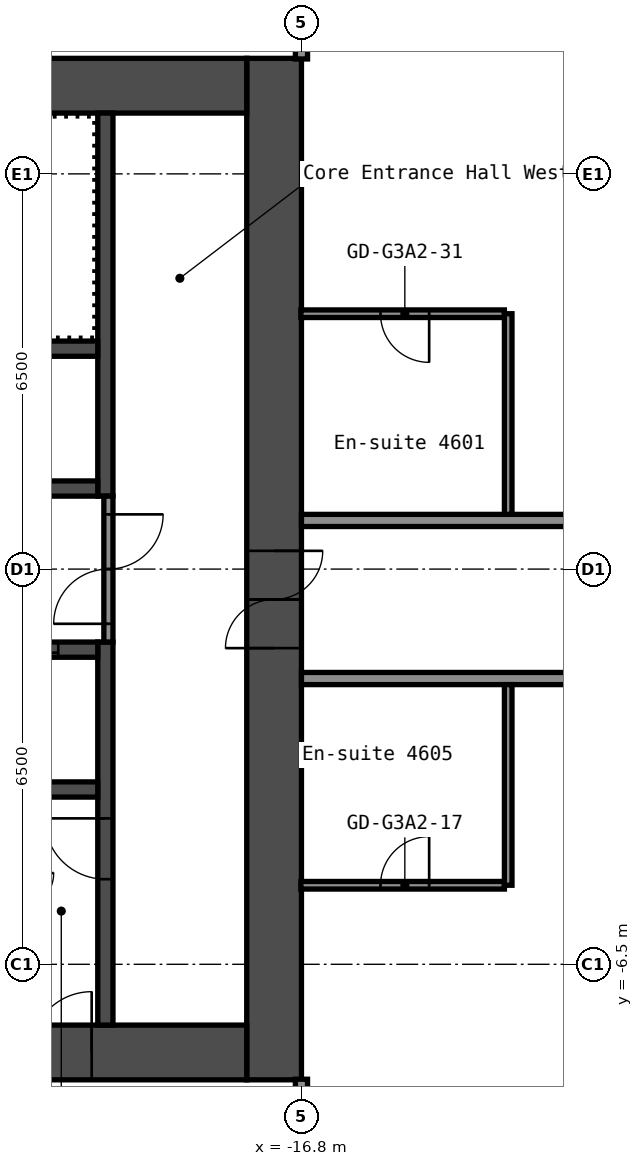
"""IFC4 building model, lengths in metres.
Left out: names, types, materials, properties, quantities, classifications, styles, units other than length and angle.
Written with IfcOpenShell. Run it as: python <this file> out.ifc"""

import sys

from ifc_helpers import new_model, si_unit, direction, frame, frame_2d, origin, place, context, subcontext, project, spatial, rectangle, extrude, element, fill, save


model = new_model("IFC4")
c1 = context("Model", 3, precision=1e-05, world=origin(), true_north=direction((0.0, 1.0)))
c2 = subcontext(c1, "Body", "Model", "MODEL_VIEW")
j1 = project(units=[si_unit("LENGTHUNIT", "METRE"), si_unit("PLANEANGLEUNIT", "RADIAN")], contexts=[c1])
p1 = place(None, origin())
s1 = spatial("IfcSite", under=j1, at=p1, CompositionType="ELEMENT")
p2 = place(p1, origin())
s2 = spatial("IfcBuilding", under=s1, at=p2, CompositionType="ELEMENT")
p3 = place(p2, frame((0.0, 0.0, 163.0)))
s3 = spatial("IfcBuildingStorey", under=s2, at=p3, CompositionType="ELEMENT", Elevation=163.0)
p4 = place(p3, frame((-17.25, -8.4, 0.0), z_axis=(0.0, 0.0, 1.0), x_axis=(0.0, 1.0, 0.0)))
e1 = element("IfcWall", 1, at=p4, inside=s3, PredefinedType="SHEAR", context=c2, shape_type="SweptSolid", body=[
    extrude(rectangle(XDim=16.8, YDim=0.9, at=frame_2d((8.4, 0.0))), origin(), (0.0, 0.0, 1.0), 2.75),
])
p5 = place(p4, frame((7.1, 0.0, 0.0)))
e2 = element("IfcOpeningElement", 2, at=p5, cuts=e1, PredefinedType="OPENING", context=c2, shape_type="SweptSolid", body=[
    extrude(rectangle(XDim=1.6, YDim=2.1, at=frame_2d((0.8, 1.05))), frame((0.0, 0.46, 0.0), z_axis=(0.0, -1.0, 0.0), x_axis=(1.0, 0.0, 0.0)), (0.0, 0.0, 1.0), 0.92),
])
p6 = place(p3, frame((-32.7, 7.95, 0.0), z_axis=(0.0, 0.0, 1.0), x_axis=(1.0, 0.0, 0.0)))
e3 = element("IfcWall", 3, at=p6, inside=s3, PredefinedType="SHEAR", context=c2, shape_type="SweptSolid", body=[
    extrude(rectangle(XDim=15.0, YDim=0.9, at=frame_2d((7.5, 0.0))), origin(), (0.0, 0.0, 1.0), 2.75),
])
p7 = place(p6, frame((3.4, 0.0, 0.0)))
e4 = element("IfcOpeningElement", 4, at=p7, cuts=e3, PredefinedType="OPENING", context=c2, shape_type="SweptSolid", body=[
    extrude(rectangle(XDim=1.2, YDim=2.1, at=frame_2d((0.6, 1.05))), frame((0.0, 0.46, 0.0), z_axis=(0.0, -1.0, 0.0), x_axis=(1.0, 0.0, 0.0)), (0.0, 0.0, 1.0), 0.92),
])
p8 = place(p6, frame((0.75, 0.0, 0.0)))
e5 = element("IfcOpeningElement", 5, at=p8, cuts=e3, PredefinedType="OPENING", context=c2, shape_type="SweptSolid", body=[
    extrude(rectangle(XDim=0.9, YDim=2.1, at=frame_2d((0.45, 1.05))), frame((0.0, 0.46, 0.0), z_axis=(0.0, -1.0, 0.0), x_axis=(1.0, 0.0, 0.0)), (0.0, 0.0, 1.0), 0.92),
])
p9 = place(p3, frame((-32.7, -7.95, 0.0), z_axis=(0.0, 0.0, 1.0), x_axis=(1.0, 0.0, 0.0)))
e6 = element("IfcWall", 6, at=p9, inside=s3, PredefinedType="SHEAR", context=c2, shape_type="SweptSolid", body=[
    extrude(rectangle(XDim=15.0, YDim=0.9, at=frame_2d((7.5, 0.0))), origin(), (0.0, 0.0, 1.0), 2.75),
])
p10 = place(p9, frame((11.45, 0.0, 0.0)))
e7 = element("IfcOpeningElement", 7, at=p10, cuts=e6, PredefinedType="OPENING", context=c2, shape_type="SweptSolid", body=[
    extrude(rectangle(XDim=1.0, YDim=2.1, at=frame_2d((0.5, 1.05))), frame((0.0, 0.46, 0.0), z_axis=(0.0, -1.0, 0.0), x_axis=(1.0, 0.0, 0.0)), (0.0, 0.0, 1.0), 0.92),
])
p11 = place(p3, frame((-20.025, 1.2, 0.0), z_axis=(0.0, 0.0, 1.0), x_axis=(0.0, 1.0, 0.0)))
e8 = element("IfcWall", 8, at=p11, inside=s3, PredefinedType="SHEAR", context=c2, shape_type="SweptSolid", body=[
    extrude(rectangle(XDim=6.3, YDim=0.25, at=frame_2d((3.15, 0.0))), origin(), (0.0, 0.0, 1.0), 2.75),
])
p12 = place(p3, frame((-20.025, -7.5, 0.0), z_axis=(0.0, 0.0, 1.0), x_axis=(0.0, 1.0, 0.0)))
e9 = element("IfcWall", 9, at=p12, inside=s3, PredefinedType="SHEAR", context=c2, shape_type="SweptSolid", body=[
    extrude(rectangle(XDim=6.3, YDim=0.25, at=frame_2d((3.15, 0.0))), origin(), (0.0, 0.0, 1.0), 2.75),
])
p13 = place(p12, frame((2.4, 0.0, 0.0)))
e10 = element("IfcOpeningElement", 10, at=p13, cuts=e9, PredefinedType="OPENING", context=c2, shape_type="SweptSolid", body=[
    extrude(rectangle(XDim=1.0, YDim=2.1, at=frame_2d((0.5, 1.05))), frame((0.0, 0.135, 0.0), z_axis=(0.0, -1.0, 0.0), x_axis=(1.0, 0.0, 0.0)), (0.0, 0.0, 1.0), 0.27),
])
p14 = place(p3, frame((-27.65, 1.325, 0.0), z_axis=(0.0, 0.0, 1.0), x_axis=(1.0, 0.0, 0.0)))
e11 = element("IfcWall", 11, at=p14, inside=s3, PredefinedType="SHEAR", context=c2, shape_type="SweptSolid", body=[
    extrude(rectangle(XDim=7.5, YDim=0.25, at=frame_2d((3.75, 0.0))), origin(), (0.0, 0.0, 1.0), 2.75),
])
p15 = place(p14, frame((4.363, 0.0, 0.0)))
e12 = element("IfcOpeningElement", 12, at=p15, cuts=e11, PredefinedType="OPENING", context=c2, shape_type="SweptSolid", body=[
    extrude(rectangle(XDim=0.9, YDim=2.1, at=frame_2d((0.45, 1.05))), frame((0.0, 0.135, 0.0), z_axis=(0.0, -1.0, 0.0), x_axis=(1.0, 0.0, 0.0)), (0.0, 0.0, 1.0), 0.27),
])
p16 = place(p14, frame((0.663, 0.0, 0.0)))
e13 = element("IfcOpeningElement", 13, at=p16, cuts=e11, PredefinedType="OPENING", context=c2, shape_type="SweptSolid", body=[
    extrude(rectangle(XDim=0.9, YDim=2.1, at=frame_2d((0.45, 1.05))), frame((0.0, 0.135, 0.0), z_axis=(0.0, -1.0, 0.0), x_axis=(1.0, 0.0, 0.0)), (0.0, 0.0, 1.0), 0.27),
])
p17 = place(p3, frame((-27.65, 3.625, 0.0), z_axis=(0.0, 0.0, 1.0), x_axis=(1.0, 0.0, 0.0)))
e14 = element("IfcWall", 14, at=p17, inside=s3, PredefinedType="SHEAR", context=c2, shape_type="SweptSolid", body=[
    extrude(rectangle(XDim=7.5, YDim=0.25, at=frame_2d((3.75, 0.0))), origin(), (0.0, 0.0, 1.0), 2.75),
])
p18 = place(p3, frame((-27.65, -1.325, 0.0), z_axis=(0.0, 0.0, 1.0), x_axis=(1.0, 0.0, 0.0)))
e15 = element("IfcWall", 15, at=p18, inside=s3, PredefinedType="SHEAR", context=c2, shape_type="SweptSolid", body=[
    extrude(rectangle(XDim=7.5, YDim=0.25, at=frame_2d((3.75, 0.0))), origin(), (0.0, 0.0, 1.0), 2.75),
])
p19 = place(p18, frame((5.75, 0.0, 0.0)))
e16 = element("IfcOpeningElement", 16, at=p19, cuts=e15, PredefinedType="OPENING", context=c2, shape_type="SweptSolid", body=[
    extrude(rectangle(XDim=1.1, YDim=2.1, at=frame_2d((0.55, 1.05))), frame((0.0, 0.135, 0.0), z_axis=(0.0, -1.0, 0.0), x_axis=(1.0, 0.0, 0.0)), (0.0, 0.0, 1.0), 0.27),
])
p20 = place(p18, frame((3.35, 0.0, 0.0)))
e17 = element("IfcOpeningElement", 17, at=p20, cuts=e15, PredefinedType="OPENING", context=c2, shape_type="SweptSolid", body=[
    extrude(rectangle(XDim=1.1, YDim=2.1, at=frame_2d((0.55, 1.05))), frame((0.0, 0.135, 0.0), z_axis=(0.0, -1.0, 0.0), x_axis=(1.0, 0.0, 0.0)), (0.0, 0.0, 1.0), 0.27),
])
p21 = place(p18, frame((0.95, 0.0, 0.0)))
e18 = element("IfcOpeningElement", 18, at=p21, cuts=e15, PredefinedType="OPENING", context=c2, shape_type="SweptSolid", body=[
    extrude(rectangle(XDim=1.1, YDim=2.1, at=frame_2d((0.55, 1.05))), frame((0.0, 0.135, 0.0), z_axis=(0.0, -1.0, 0.0), x_axis=(1.0, 0.0, 0.0)), (0.0, 0.0, 1.0), 0.27),
])
p22 = place(p3, frame((-27.65, -3.625, 0.0), z_axis=(0.0, 0.0, 1.0), x_axis=(1.0, 0.0, 0.0)))
e19 = element("IfcWall", 19, at=p22, inside=s3, PredefinedType="SHEAR", context=c2, shape_type="SweptSolid", body=[
    extrude(rectangle(XDim=7.5, YDim=0.25, at=frame_2d((3.75, 0.0))), origin(), (0.0, 0.0, 1.0), 2.75),
])
p23 = place(p3, frame((-19.975, -1.2, 0.0), z_axis=(0.0, 0.0, 1.0), x_axis=(0.0, 1.0, 0.0)))
e20 = element("IfcWall", 20, at=p23, inside=s3, PredefinedType="PARTITIONING", context=c2, shape_type="SweptSolid", body=[
    extrude(rectangle(XDim=2.4, YDim=0.15, at=frame_2d((1.2, 0.0))), origin(), (0.0, 0.0, 1.0), 2.75),
])
p24 = place(p23, frame((0.3, 0.0, 0.0)))
e21 = element("IfcOpeningElement", 21, at=p24, cuts=e20, PredefinedType="OPENING", context=c2, shape_type="SweptSolid", body=[
    extrude(rectangle(XDim=1.8, YDim=2.1, at=frame_2d((0.9, 1.05))), frame((0.0, 0.085, 0.0), z_axis=(0.0, -1.0, 0.0), x_axis=(1.0, 0.0, 0.0)), (0.0, 0.0, 1.0), 0.17),
])
p25 = place(p3, frame((-16.81, -5.2, 0.0), z_axis=(0.0, 0.0, 1.0), x_axis=(1.0, 0.0, 0.0)))
e22 = element("IfcWall", 22, at=p25, inside=s3, PredefinedType="PARTITIONING", context=c2, shape_type="SweptSolid", body=[
    extrude(rectangle(XDim=3.348, YDim=0.125, at=frame_2d((1.674, 0.0))), origin(), (0.0, 0.0, 1.0), 2.75),
])
p26 = place(p25, frame((1.31, 0.0, 0.0)))
e23 = element("IfcOpeningElement", 23, at=p26, cuts=e22, PredefinedType="OPENING", context=c2, shape_type="SweptSolid", body=[
    extrude(rectangle(XDim=0.8, YDim=2.1, at=frame_2d((0.4, 1.05))), frame((0.0, 0.073, 0.0), z_axis=(0.0, -1.0, 0.0), x_axis=(1.0, 0.0, 0.0)), (0.0, 0.0, 1.0), 0.145),
])
p27 = place(p3, frame((-16.8, -1.8, 0.0), z_axis=(0.0, 0.0, 1.0), x_axis=(1.0, 0.0, 0.0)))
e24 = element("IfcWall", 24, at=p27, inside=s3, PredefinedType="PARTITIONING", context=c2, shape_type="SweptSolid", body=[
    extrude(rectangle(XDim=33.6, YDim=0.2, at=frame_2d((16.8, 0.0))), origin(), (0.0, 0.0, 1.0), 2.75),
])
p28 = place(p27, frame((5.4, 0.0, 0.0)))
e25 = element("IfcOpeningElement", 25, at=p28, cuts=e24, PredefinedType="OPENING", context=c2, shape_type="SweptSolid", body=[
    extrude(rectangle(XDim=1.0, YDim=2.1, at=frame_2d((0.5, 1.05))), frame((0.0, 0.11, 0.0), z_axis=(0.0, -1.0, 0.0), x_axis=(1.0, 0.0, 0.0)), (0.0, 0.0, 1.0), 0.22),
])
p29 = place(p27, frame((10.385, 0.0, 0.0)))
e26 = element("IfcOpeningElement", 26, at=p29, cuts=e24, PredefinedType="OPENING", context=c2, shape_type="SweptSolid", body=[
    extrude(rectangle(XDim=0.9, YDim=2.1, at=frame_2d((0.45, 1.05))), frame((0.0, 0.11, 0.0), z_axis=(0.0, -1.0, 0.0), x_axis=(1.0, 0.0, 0.0)), (0.0, 0.0, 1.0), 0.22),
])
p30 = place(p27, frame((14.585, 0.0, 0.0)))
e27 = element("IfcOpeningElement", 27, at=p30, cuts=e24, PredefinedType="OPENING", context=c2, shape_type="SweptSolid", body=[
    extrude(rectangle(XDim=0.9, YDim=2.1, at=frame_2d((0.45, 1.05))), frame((0.0, 0.11, 0.0), z_axis=(0.0, -1.0, 0.0), x_axis=(1.0, 0.0, 0.0)), (0.0, 0.0, 1.0), 0.22),
])
p31 = place(p27, frame((22.2, 0.0, 0.0)))
e28 = element("IfcOpeningElement", 28, at=p31, cuts=e24, PredefinedType="OPENING", context=c2, shape_type="SweptSolid", body=[
    extrude(rectangle(XDim=1.0, YDim=2.1, at=frame_2d((0.5, 1.05))), frame((0.0, 0.11, 0.0), z_axis=(0.0, -1.0, 0.0), x_axis=(1.0, 0.0, 0.0)), (0.0, 0.0, 1.0), 0.22),
])
p32 = place(p27, frame((30.6, 0.0, 0.0)))
e29 = element("IfcOpeningElement", 29, at=p32, cuts=e24, PredefinedType="OPENING", context=c2, shape_type="SweptSolid", body=[
    extrude(rectangle(XDim=1.0, YDim=2.1, at=frame_2d((0.5, 1.05))), frame((0.0, 0.11, 0.0), z_axis=(0.0, -1.0, 0.0), x_axis=(1.0, 0.0, 0.0)), (0.0, 0.0, 1.0), 0.22),
])
p33 = place(p3, frame((-16.8, 0.8, 0.0), z_axis=(0.0, 0.0, 1.0), x_axis=(1.0, 0.0, 0.0)))
e30 = element("IfcWall", 30, at=p33, inside=s3, PredefinedType="PARTITIONING", context=c2, shape_type="SweptSolid", body=[
    extrude(rectangle(XDim=33.6, YDim=0.2, at=frame_2d((16.8, 0.0))), origin(), (0.0, 0.0, 1.0), 2.75),
])
p34 = place(p33, frame((5.4, 0.0, 0.0)))
e31 = element("IfcOpeningElement", 31, at=p34, cuts=e30, PredefinedType="OPENING", context=c2, shape_type="SweptSolid", body=[
    extrude(rectangle(XDim=1.0, YDim=2.1, at=frame_2d((0.5, 1.05))), frame((0.0, 0.11, 0.0), z_axis=(0.0, -1.0, 0.0), x_axis=(1.0, 0.0, 0.0)), (0.0, 0.0, 1.0), 0.22),
])
p35 = place(p33, frame((9.88, 0.0, 0.0)))
e32 = element("IfcOpeningElement", 32, at=p35, cuts=e30, PredefinedType="OPENING", context=c2, shape_type="SweptSolid", body=[
    extrude(rectangle(XDim=0.9, YDim=2.1, at=frame_2d((0.45, 1.05))), frame((0.0, 0.11, 0.0), z_axis=(0.0, -1.0, 0.0), x_axis=(1.0, 0.0, 0.0)), (0.0, 0.0, 1.0), 0.22),
])
p36 = place(p33, frame((14.08, 0.0, 0.0)))
e33 = element("IfcOpeningElement", 33, at=p36, cuts=e30, PredefinedType="OPENING", context=c2, shape_type="SweptSolid", body=[
    extrude(rectangle(XDim=0.9, YDim=2.1, at=frame_2d((0.45, 1.05))), frame((0.0, 0.11, 0.0), z_axis=(0.0, -1.0, 0.0), x_axis=(1.0, 0.0, 0.0)), (0.0, 0.0, 1.0), 0.22),
])
p37 = place(p33, frame((18.7, 0.0, 0.0)))
e34 = element("IfcOpeningElement", 34, at=p37, cuts=e30, PredefinedType="OPENING", context=c2, shape_type="SweptSolid", body=[
    extrude(rectangle(XDim=0.9, YDim=2.1, at=frame_2d((0.45, 1.05))), frame((0.0, 0.11, 0.0), z_axis=(0.0, -1.0, 0.0), x_axis=(1.0, 0.0, 0.0)), (0.0, 0.0, 1.0), 0.22),
])
p38 = place(p33, frame((22.9, 0.0, 0.0)))
e35 = element("IfcOpeningElement", 35, at=p38, cuts=e30, PredefinedType="OPENING", context=c2, shape_type="SweptSolid", body=[
    extrude(rectangle(XDim=0.9, YDim=2.1, at=frame_2d((0.45, 1.05))), frame((0.0, 0.11, 0.0), z_axis=(0.0, -1.0, 0.0), x_axis=(1.0, 0.0, 0.0)), (0.0, 0.0, 1.0), 0.22),
])
p39 = place(p33, frame((30.6, 0.0, 0.0)))
e36 = element("IfcOpeningElement", 36, at=p39, cuts=e30, PredefinedType="OPENING", context=c2, shape_type="SweptSolid", body=[
    extrude(rectangle(XDim=1.0, YDim=2.1, at=frame_2d((0.5, 1.05))), frame((0.0, 0.11, 0.0), z_axis=(0.0, -1.0, 0.0), x_axis=(1.0, 0.0, 0.0)), (0.0, 0.0, 1.0), 0.22),
])
p40 = place(p3, frame((-16.81, 4.2, 0.0), z_axis=(0.0, 0.0, 1.0), x_axis=(1.0, 0.0, 0.0)))
e37 = element("IfcWall", 37, at=p40, inside=s3, PredefinedType="PARTITIONING", context=c2, shape_type="SweptSolid", body=[
    extrude(rectangle(XDim=3.348, YDim=0.125, at=frame_2d((1.674, 0.0))), origin(), (0.0, 0.0, 1.0), 2.75),
])
p41 = place(p40, frame((1.31, 0.0, 0.0)))
e38 = element("IfcOpeningElement", 38, at=p41, cuts=e37, PredefinedType="OPENING", context=c2, shape_type="SweptSolid", body=[
    extrude(rectangle(XDim=0.8, YDim=2.1, at=frame_2d((0.4, 1.05))), frame((0.0, 0.073, 0.0), z_axis=(0.0, -1.0, 0.0), x_axis=(1.0, 0.0, 0.0)), (0.0, 0.0, 1.0), 0.145),
])
p42 = place(p3, frame((-16.8, -19.3, 0.0), z_axis=(0.0, 0.0, 1.0), x_axis=(0.0, 1.0, 0.0)))
e39 = element("IfcWall", 39, at=p42, inside=s3, PredefinedType="PARTITIONING", context=c2, shape_type="SweptSolid", body=[
    extrude(rectangle(XDim=10.91, YDim=0.2, at=frame_2d((5.455, 0.0))), origin(), (0.0, 0.0, 1.0), 2.75),
])
p43 = place(p3, frame((-16.8, 8.39, 0.0), z_axis=(0.0, 0.0, 1.0), x_axis=(0.0, 1.0, 0.0)))
e40 = element("IfcWall", 40, at=p43, inside=s3, PredefinedType="PARTITIONING", context=c2, shape_type="SweptSolid", body=[
    extrude(rectangle(XDim=9.91, YDim=0.2, at=frame_2d((4.955, 0.0))), origin(), (0.0, 0.0, 1.0), 2.75),
])
for number, where, z_axis, x_axis in (
    (41, (-13.4, -5.2, 0.0), (0.0, 0.0, 1.0), (0.0, 1.0, 0.0)),
    (42, (-13.4, 0.9, 0.0), (0.0, 0.0, 1.0), (0.0, 1.0, 0.0)),
):
    element("IfcWall", number, at=place(p3, frame(where, z_axis=z_axis, x_axis=x_axis)), inside=s3, PredefinedType="PARTITIONING", context=c2, shape_type="SweptSolid", body=[
        extrude(rectangle(XDim=3.3, YDim=0.125, at=frame_2d((1.65, 0.0))), origin(), (0.0, 0.0, 1.0), 2.75),
    ])
p44 = place(p5, origin())
e43 = element("IfcDoor", 43, at=p44, inside=s3, OperationType="DOUBLE_DOOR_SINGLE_SWING", PredefinedType="DOOR", context=c2, shape_type="SweptSolid", body=[
    extrude(rectangle(XDim=1.6, YDim=2.1, at=frame_2d((0.8, 1.05))), frame((0.0, 0.025, 0.0), z_axis=(0.0, -1.0, 0.0), x_axis=(1.0, 0.0, 0.0)), (0.0, 0.0, 1.0), 0.05),
])
fill(e2, e43)
p45 = place(p10, origin())
e44 = element("IfcDoor", 44, at=p45, inside=s3, OperationType="SINGLE_SWING_LEFT", PredefinedType="DOOR", context=c2, shape_type="SweptSolid", body=[
    extrude(rectangle(XDim=1.0, YDim=2.1, at=frame_2d((0.5, 1.05))), frame((0.0, 0.025, 0.0), z_axis=(0.0, -1.0, 0.0), x_axis=(1.0, 0.0, 0.0)), (0.0, 0.0, 1.0), 0.05),
])
fill(e7, e44)
p46 = place(p13, origin())
e45 = element("IfcDoor", 45, at=p46, inside=s3, OperationType="SINGLE_SWING_LEFT", PredefinedType="DOOR", context=c2, shape_type="SweptSolid", body=[
    extrude(rectangle(XDim=1.0, YDim=2.1, at=frame_2d((0.5, 1.05))), frame((0.0, 0.025, 0.0), z_axis=(0.0, -1.0, 0.0), x_axis=(1.0, 0.0, 0.0)), (0.0, 0.0, 1.0), 0.05),
])
fill(e10, e45)
p47 = place(p24, origin())
e46 = element("IfcDoor", 46, at=p47, inside=s3, OperationType="DOUBLE_DOOR_SINGLE_SWING", PredefinedType="DOOR", context=c2, shape_type="SweptSolid", body=[
    extrude(rectangle(XDim=1.8, YDim=2.1, at=frame_2d((0.9, 1.05))), frame((0.0, 0.025, 0.0), z_axis=(0.0, -1.0, 0.0), x_axis=(1.0, 0.0, 0.0)), (0.0, 0.0, 1.0), 0.05),
])
fill(e21, e46)
p48 = place(p19, origin())
e47 = element("IfcDoor", 47, at=p48, inside=s3, OperationType="DOUBLE_DOOR_SLIDING", PredefinedType="DOOR", context=c2, shape_type="SweptSolid", body=[
    extrude(rectangle(XDim=1.1, YDim=2.1, at=frame_2d((0.55, 1.05))), frame((0.0, 0.025, 0.0), z_axis=(0.0, -1.0, 0.0), x_axis=(1.0, 0.0, 0.0)), (0.0, 0.0, 1.0), 0.05),
])
fill(e16, e47)
p49 = place(p26, origin())
e48 = element("IfcDoor", 48, at=p49, inside=s3, OperationType="SINGLE_SWING_LEFT", PredefinedType="DOOR", context=c2, shape_type="SweptSolid", body=[
    extrude(rectangle(XDim=0.8, YDim=2.1, at=frame_2d((0.4, 1.05))), frame((0.0, 0.025, 0.0), z_axis=(0.0, -1.0, 0.0), x_axis=(1.0, 0.0, 0.0)), (0.0, 0.0, 1.0), 0.05),
])
fill(e23, e48)
p50 = place(p41, origin())
e49 = element("IfcDoor", 49, at=p50, inside=s3, OperationType="SINGLE_SWING_RIGHT", PredefinedType="DOOR", context=c2, shape_type="SweptSolid", body=[
    extrude(rectangle(XDim=0.8, YDim=2.1, at=frame_2d((0.4, 1.05))), frame((0.0, 0.025, 0.0), z_axis=(0.0, -1.0, 0.0), x_axis=(1.0, 0.0, 0.0)), (0.0, 0.0, 1.0), 0.05),
])
fill(e38, e49)
save(model, sys.argv[1])
